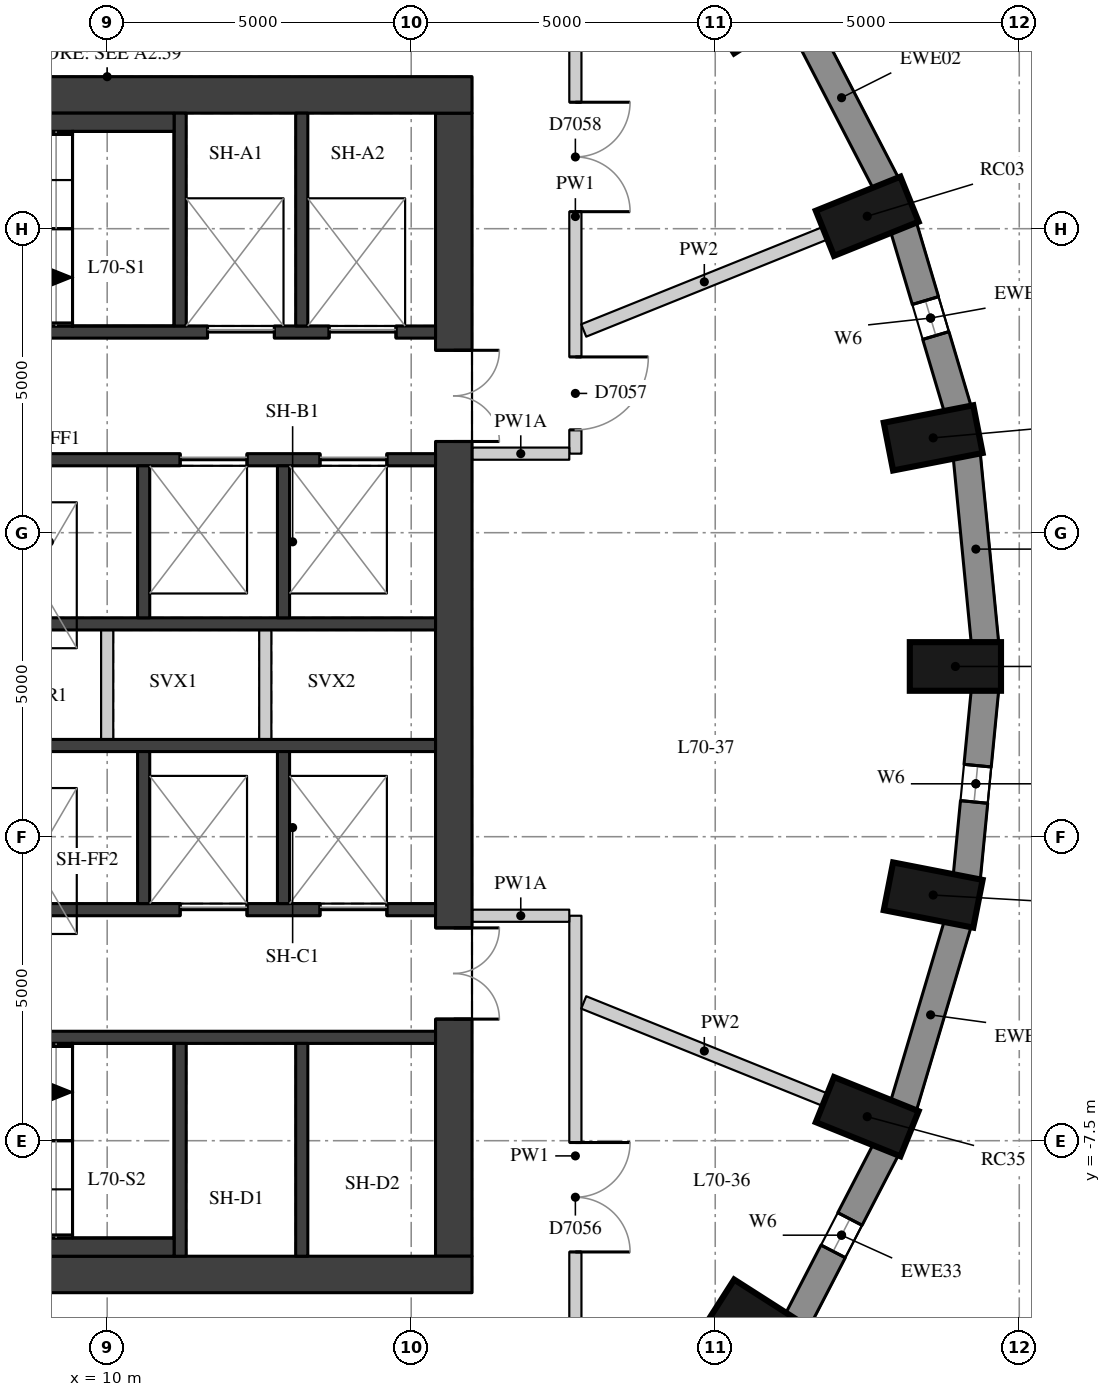
"""IFC4 building model, lengths in metres.
Left out: names, types, materials, properties, quantities, classifications, styles, units other than length and angle.
Written with IfcOpenShell. Run it as: python <this file> out.ifc"""

import sys

from ifc_helpers import new_model, si_unit, direction, frame, frame_2d, origin, origin_2d, place, context, subcontext, project, spatial, rectangle, extrude, element, fill, save


model = new_model("IFC4")
c1 = context("Model", 3, precision=1e-05, world=origin(), true_north=direction((0.0, 1.0)))
c2 = subcontext(c1, "Body", "Model", "MODEL_VIEW")
j1 = project(units=[si_unit("LENGTHUNIT", "METRE"), si_unit("PLANEANGLEUNIT", "RADIAN")], contexts=[c1])
p1 = place(None, origin())
s1 = spatial("IfcSite", under=j1, at=p1, CompositionType="ELEMENT")
p2 = place(p1, origin())
s2 = spatial("IfcBuilding", under=s1, at=p2, CompositionType="ELEMENT")
p3 = place(p2, frame((0.0, 0.0, 246.5)))
s3 = spatial("IfcBuildingStorey", under=s2, at=p3, CompositionType="ELEMENT", Elevation=246.5)
for number, where, z_axis, x_axis in (
    (1, (23.95, 0.3, 0.0), (0.0, 0.0, 1.0), (1.0, 0.0, 0.0)),
    (2, (23.585, 4.06, 0.0), (0.0, 0.0, 1.0), (0.981, 0.192, 0.0)),
    (3, (22.5, 7.705, 0.0), (0.0, 0.0, 1.0), (0.928, 0.374, 0.0)),
    (4, (20.728, 11.125, 0.0), (0.0, 0.0, 1.0), (0.843, 0.539, 0.0)),
    (5, (20.728, -10.525, 0.0), (0.0, 0.0, 1.0), (0.843, -0.539, 0.0)),
    (6, (22.5, -7.105, 0.0), (0.0, 0.0, 1.0), (0.928, -0.374, 0.0)),
    (7, (23.585, -3.459, 0.0), (0.0, 0.0, 1.0), (0.981, -0.192, 0.0)),
):
    element("IfcColumn", number, at=place(p3, frame(where, z_axis=z_axis, x_axis=x_axis)), inside=s3, PredefinedType="COLUMN", context=c2, shape_type="SweptSolid", body=[
        extrude(rectangle(XDim=1.5, YDim=0.8, at=origin_2d()), origin(), (0.0, 0.0, 1.0), 3.3),
    ])
p4 = place(p3, frame((24.437, 0.68, 0.0), z_axis=(0.0, 0.0, 1.0), x_axis=(-0.096740086873, 0.995309678237, 0.0)))
e8 = element("IfcWall", 8, at=p4, inside=s3, PredefinedType="SOLIDWALL", context=c2, shape_type="SweptSolid", body=[
    extrude(rectangle(XDim=3.114, YDim=0.45, at=frame_2d((1.557, 0.0))), origin(), (0.0, 0.0, 1.0), 3.02),
])
p5 = place(p3, frame((23.99, 4.526, 0.0), z_axis=(0.0, 0.0, 1.0), x_axis=(-0.285263800865, 0.958449040855, 0.0)))
e9 = element("IfcWall", 9, at=p5, inside=s3, PredefinedType="SOLIDWALL", context=c2, shape_type="SweptSolid", body=[
    extrude(rectangle(XDim=3.139, YDim=0.45, at=frame_2d((1.57, 0.0))), origin(), (0.0, 0.0, 1.0), 3.02),
])
p6 = place(p5, frame((1.27, 0.0, 0.4)))
e10 = element("IfcOpeningElement", 10, at=p6, cuts=e9, PredefinedType="OPENING", context=c2, shape_type="SweptSolid", body=[
    extrude(rectangle(XDim=0.6, YDim=1.75, at=frame_2d((0.3, 0.875))), frame((0.0, 0.235, 0.0), z_axis=(0.0, -1.0, 0.0), x_axis=(1.0, 0.0, 0.0)), (0.0, 0.0, 1.0), 0.47),
])
p7 = place(p3, frame((22.81, 8.24, 0.0), z_axis=(0.0, 0.0, 1.0), x_axis=(-0.459889857669, 0.887975967475, 0.0)))
e11 = element("IfcWall", 11, at=p7, inside=s3, PredefinedType="SOLIDWALL", context=c2, shape_type="SweptSolid", body=[
    extrude(rectangle(XDim=3.186, YDim=0.45, at=frame_2d((1.593, 0.0))), origin(), (0.0, 0.0, 1.0), 3.02),
])
p8 = place(p3, frame((21.345, -10.468, 0.0), z_axis=(0.0, 0.0, 1.0), x_axis=(0.459921155255, 0.887959757505, 0.0)))
e12 = element("IfcWall", 12, at=p8, inside=s3, PredefinedType="SOLIDWALL", context=c2, shape_type="SweptSolid", body=[
    extrude(rectangle(XDim=3.186, YDim=0.45, at=frame_2d((1.593, 0.0))), origin(), (0.0, 0.0, 1.0), 3.02),
])
p9 = place(p8, frame((1.293, 0.0, 0.4)))
e13 = element("IfcOpeningElement", 13, at=p9, cuts=e12, PredefinedType="OPENING", context=c2, shape_type="SweptSolid", body=[
    extrude(rectangle(XDim=0.6, YDim=1.75, at=frame_2d((0.3, 0.875))), frame((0.0, 0.235, 0.0), z_axis=(0.0, -1.0, 0.0), x_axis=(1.0, 0.0, 0.0)), (0.0, 0.0, 1.0), 0.47),
])
p10 = place(p3, frame((23.094, -6.935, 0.0), z_axis=(0.0, 0.0, 1.0), x_axis=(0.285263800865, 0.958449040855, 0.0)))
e14 = element("IfcWall", 14, at=p10, inside=s3, PredefinedType="SOLIDWALL", context=c2, shape_type="SweptSolid", body=[
    extrude(rectangle(XDim=3.139, YDim=0.45, at=frame_2d((1.57, 0.0))), origin(), (0.0, 0.0, 1.0), 3.02),
])
p11 = place(p3, frame((24.136, -3.18, 0.0), z_axis=(0.0, 0.0, 1.0), x_axis=(0.09673253904, 0.995310411827, 0.0)))
e15 = element("IfcWall", 15, at=p11, inside=s3, PredefinedType="SOLIDWALL", context=c2, shape_type="SweptSolid", body=[
    extrude(rectangle(XDim=3.115, YDim=0.45, at=frame_2d((1.557, 0.0))), origin(), (0.0, 0.0, 1.0), 3.02),
])
p12 = place(p11, frame((1.257, 0.0, 0.4)))
e16 = element("IfcOpeningElement", 16, at=p12, cuts=e15, PredefinedType="OPENING", context=c2, shape_type="SweptSolid", body=[
    extrude(rectangle(XDim=0.6, YDim=1.75, at=frame_2d((0.3, 0.875))), frame((0.0, 0.235, 0.0), z_axis=(0.0, -1.0, 0.0), x_axis=(1.0, 0.0, 0.0)), (0.0, 0.0, 1.0), 0.47),
])
p13 = place(p3, frame((15.7, -9.4, 0.0), z_axis=(0.0, 0.0, 1.0), x_axis=(0.0, 1.0, 0.0)))
e17 = element("IfcWall", 17, at=p13, inside=s3, PredefinedType="SHEAR", context=c2, shape_type="SweptSolid", body=[
    extrude(rectangle(XDim=18.8, YDim=0.6, at=frame_2d((9.4, 0.0))), origin(), (0.0, 0.0, 1.0), 3.02),
])
p14 = place(p13, frame((13.4, 0.0, 0.0)))
e18 = element("IfcOpeningElement", 18, at=p14, cuts=e17, PredefinedType="OPENING", context=c2, shape_type="SweptSolid", body=[
    extrude(rectangle(XDim=1.5, YDim=2.1, at=frame_2d((0.75, 1.05))), frame((0.0, 0.31, 0.0), z_axis=(0.0, -1.0, 0.0), x_axis=(1.0, 0.0, 0.0)), (0.0, 0.0, 1.0), 0.62),
])
p15 = place(p13, frame((3.9, 0.0, 0.0)))
e19 = element("IfcOpeningElement", 19, at=p15, cuts=e17, PredefinedType="OPENING", context=c2, shape_type="SweptSolid", body=[
    extrude(rectangle(XDim=1.5, YDim=2.1, at=frame_2d((0.75, 1.05))), frame((0.0, 0.31, 0.0), z_axis=(0.0, -1.0, 0.0), x_axis=(1.0, 0.0, 0.0)), (0.0, 0.0, 1.0), 0.62),
])
for number, where, z_axis, x_axis in (
    (20, (4.0, 9.7, 0.0), (0.0, 0.0, 1.0), (1.0, 0.0, 0.0)),
    (21, (4.0, -9.7, 0.0), (0.0, 0.0, 1.0), (1.0, 0.0, 0.0)),
):
    element("IfcWall", number, at=place(p3, frame(where, z_axis=z_axis, x_axis=x_axis)), inside=s3, PredefinedType="SHEAR", context=c2, shape_type="SweptSolid", body=[
        extrude(rectangle(XDim=12.0, YDim=0.6, at=frame_2d((6.0, 0.0))), origin(), (0.0, 0.0, 1.0), 3.02),
    ])
p16 = place(p3, frame((4.6, 5.8, 0.0), z_axis=(0.0, 0.0, 1.0), x_axis=(1.0, 0.0, 0.0)))
e22 = element("IfcWall", 22, at=p16, inside=s3, PredefinedType="SHEAR", context=c2, shape_type="SweptSolid", body=[
    extrude(rectangle(XDim=10.8, YDim=0.2, at=frame_2d((5.4, 0.0))), origin(), (0.0, 0.0, 1.0), 3.02),
])
p17 = place(p16, frame((7.05, 0.0, 0.0)))
e23 = element("IfcOpeningElement", 23, at=p17, cuts=e22, PredefinedType="OPENING", context=c2, shape_type="SweptSolid", body=[
    extrude(rectangle(XDim=1.1, YDim=2.1, at=frame_2d((0.55, 1.05))), frame((0.0, 0.11, 0.0), z_axis=(0.0, -1.0, 0.0), x_axis=(1.0, 0.0, 0.0)), (0.0, 0.0, 1.0), 0.22),
])
p18 = place(p16, frame((9.05, 0.0, 0.0)))
e24 = element("IfcOpeningElement", 24, at=p18, cuts=e22, PredefinedType="OPENING", context=c2, shape_type="SweptSolid", body=[
    extrude(rectangle(XDim=1.1, YDim=2.1, at=frame_2d((0.55, 1.05))), frame((0.0, 0.11, 0.0), z_axis=(0.0, -1.0, 0.0), x_axis=(1.0, 0.0, 0.0)), (0.0, 0.0, 1.0), 0.22),
])
p19 = place(p3, frame((4.6, 3.7, 0.0), z_axis=(0.0, 0.0, 1.0), x_axis=(1.0, 0.0, 0.0)))
e25 = element("IfcWall", 25, at=p19, inside=s3, PredefinedType="SHEAR", context=c2, shape_type="SweptSolid", body=[
    extrude(rectangle(XDim=10.8, YDim=0.2, at=frame_2d((5.4, 0.0))), origin(), (0.0, 0.0, 1.0), 3.02),
])
p20 = place(p19, frame((6.6, 0.0, 0.0)))
e26 = element("IfcOpeningElement", 26, at=p20, cuts=e25, PredefinedType="OPENING", context=c2, shape_type="SweptSolid", body=[
    extrude(rectangle(XDim=1.1, YDim=2.1, at=frame_2d((0.55, 1.05))), frame((0.0, 0.11, 0.0), z_axis=(0.0, -1.0, 0.0), x_axis=(1.0, 0.0, 0.0)), (0.0, 0.0, 1.0), 0.22),
])
p21 = place(p19, frame((8.9, 0.0, 0.0)))
e27 = element("IfcOpeningElement", 27, at=p21, cuts=e25, PredefinedType="OPENING", context=c2, shape_type="SweptSolid", body=[
    extrude(rectangle(XDim=1.1, YDim=2.1, at=frame_2d((0.55, 1.05))), frame((0.0, 0.11, 0.0), z_axis=(0.0, -1.0, 0.0), x_axis=(1.0, 0.0, 0.0)), (0.0, 0.0, 1.0), 0.22),
])
for number, where, z_axis, x_axis in (
    (28, (4.6, 1.0, 0.0), (0.0, 0.0, 1.0), (1.0, 0.0, 0.0)),
    (29, (4.6, -1.0, 0.0), (0.0, 0.0, 1.0), (1.0, 0.0, 0.0)),
):
    element("IfcWall", number, at=place(p3, frame(where, z_axis=z_axis, x_axis=x_axis)), inside=s3, PredefinedType="SHEAR", context=c2, shape_type="SweptSolid", body=[
        extrude(rectangle(XDim=10.8, YDim=0.2, at=frame_2d((5.4, 0.0))), origin(), (0.0, 0.0, 1.0), 3.02),
    ])
p22 = place(p3, frame((4.6, -3.7, 0.0), z_axis=(0.0, 0.0, 1.0), x_axis=(1.0, 0.0, 0.0)))
e30 = element("IfcWall", 30, at=p22, inside=s3, PredefinedType="SHEAR", context=c2, shape_type="SweptSolid", body=[
    extrude(rectangle(XDim=10.8, YDim=0.2, at=frame_2d((5.4, 0.0))), origin(), (0.0, 0.0, 1.0), 3.02),
])
p23 = place(p22, frame((6.6, 0.0, 0.0)))
e31 = element("IfcOpeningElement", 31, at=p23, cuts=e30, PredefinedType="OPENING", context=c2, shape_type="SweptSolid", body=[
    extrude(rectangle(XDim=1.1, YDim=2.1, at=frame_2d((0.55, 1.05))), frame((0.0, 0.11, 0.0), z_axis=(0.0, -1.0, 0.0), x_axis=(1.0, 0.0, 0.0)), (0.0, 0.0, 1.0), 0.22),
])
p24 = place(p22, frame((8.9, 0.0, 0.0)))
e32 = element("IfcOpeningElement", 32, at=p24, cuts=e30, PredefinedType="OPENING", context=c2, shape_type="SweptSolid", body=[
    extrude(rectangle(XDim=1.1, YDim=2.1, at=frame_2d((0.55, 1.05))), frame((0.0, 0.11, 0.0), z_axis=(0.0, -1.0, 0.0), x_axis=(1.0, 0.0, 0.0)), (0.0, 0.0, 1.0), 0.22),
])
p25 = place(p3, frame((4.6, -5.8, 0.0), z_axis=(0.0, 0.0, 1.0), x_axis=(1.0, 0.0, 0.0)))
e33 = element("IfcWall", 33, at=p25, inside=s3, PredefinedType="SHEAR", context=c2, shape_type="SweptSolid", body=[
    extrude(rectangle(XDim=10.8, YDim=0.2, at=frame_2d((5.4, 0.0))), origin(), (0.0, 0.0, 1.0), 3.02),
])
for number, where, z_axis, x_axis in (
    (34, (11.2, 5.9, 0.0), (0.0, 0.0, 1.0), (0.0, 1.0, 0.0)),
    (35, (11.2, -9.4, 0.0), (0.0, 0.0, 1.0), (0.0, 1.0, 0.0)),
    (36, (13.2, 5.9, 0.0), (0.0, 0.0, 1.0), (0.0, 1.0, 0.0)),
    (37, (13.2, -9.4, 0.0), (0.0, 0.0, 1.0), (0.0, 1.0, 0.0)),
):
    element("IfcWall", number, at=place(p3, frame(where, z_axis=z_axis, x_axis=x_axis)), inside=s3, PredefinedType="SHEAR", context=c2, shape_type="SweptSolid", body=[
        extrude(rectangle(XDim=3.5, YDim=0.2, at=frame_2d((1.75, 0.0))), origin(), (0.0, 0.0, 1.0), 3.02),
    ])
for number, where, z_axis, x_axis in (
    (38, (10.6, 1.1, 0.0), (0.0, 0.0, 1.0), (0.0, 1.0, 0.0)),
    (39, (10.6, -3.6, 0.0), (0.0, 0.0, 1.0), (0.0, 1.0, 0.0)),
    (40, (12.9, 1.1, 0.0), (0.0, 0.0, 1.0), (0.0, 1.0, 0.0)),
    (41, (12.9, -3.6, 0.0), (0.0, 0.0, 1.0), (0.0, 1.0, 0.0)),
):
    element("IfcWall", number, at=place(p3, frame(where, z_axis=z_axis, x_axis=x_axis)), inside=s3, PredefinedType="SHEAR", context=c2, shape_type="SweptSolid", body=[
        extrude(rectangle(XDim=2.5, YDim=0.2, at=frame_2d((1.25, 0.0))), origin(), (0.0, 0.0, 1.0), 3.02),
    ])
for number, where, z_axis, x_axis in (
    (42, (10.0, -0.9, 0.0), (0.0, 0.0, 1.0), (0.0, 1.0, 0.0)),
    (43, (12.6, -0.9, 0.0), (0.0, 0.0, 1.0), (0.0, 1.0, 0.0)),
):
    element("IfcWall", number, at=place(p3, frame(where, z_axis=z_axis, x_axis=x_axis)), inside=s3, PredefinedType="PARTITIONING", context=c2, shape_type="SweptSolid", body=[
        extrude(rectangle(XDim=1.8, YDim=0.2, at=frame_2d((0.9, 0.0))), origin(), (0.0, 0.0, 1.0), 3.02),
    ])
for number, where, z_axis, x_axis in (
    (44, (6.22, 9.25, 0.0), (0.0, 0.0, 1.0), (1.0, 0.0, 0.0)),
    (45, (6.22, -9.25, 0.0), (0.0, 0.0, 1.0), (1.0, 0.0, 0.0)),
):
    element("IfcWall", number, at=place(p3, frame(where, z_axis=z_axis, x_axis=x_axis)), inside=s3, PredefinedType="PARTITIONING", context=c2, shape_type="SweptSolid", body=[
        extrude(rectangle(XDim=4.88, YDim=0.3, at=frame_2d((2.44, 0.0))), origin(), (0.0, 0.0, 1.0), 3.02),
    ])
p26 = place(p3, frame((17.7, -3.8, 0.0), z_axis=(0.0, 0.0, 1.0), x_axis=(0.0, -1.0, 0.0)))
e46 = element("IfcWall", 46, at=p26, inside=s3, PredefinedType="PARTITIONING", context=c2, shape_type="SweptSolid", body=[
    extrude(rectangle(XDim=7.9, YDim=0.2, at=frame_2d((3.95, 0.0))), origin(), (0.0, 0.0, 1.0), 3.02),
])
p27 = place(p26, frame((3.73, 0.0, 0.0)))
e47 = element("IfcOpeningElement", 47, at=p27, cuts=e46, PredefinedType="OPENING", context=c2, shape_type="SweptSolid", body=[
    extrude(rectangle(XDim=1.8, YDim=2.1, at=frame_2d((0.9, 1.05))), frame((0.0, 0.11, 0.0), z_axis=(0.0, -1.0, 0.0), x_axis=(1.0, 0.0, 0.0)), (0.0, 0.0, 1.0), 0.22),
])
p28 = place(p3, frame((17.7, 11.6, 0.0), z_axis=(0.0, 0.0, 1.0), x_axis=(0.0, -1.0, 0.0)))
e48 = element("IfcWall", 48, at=p28, inside=s3, PredefinedType="PARTITIONING", context=c2, shape_type="SweptSolid", body=[
    extrude(rectangle(XDim=7.8, YDim=0.2, at=frame_2d((3.9, 0.0))), origin(), (0.0, 0.0, 1.0), 3.02),
])
p29 = place(p28, frame((6.209, 0.0, 0.0)))
e49 = element("IfcOpeningElement", 49, at=p29, cuts=e48, PredefinedType="OPENING", context=c2, shape_type="SweptSolid", body=[
    extrude(rectangle(XDim=1.2, YDim=2.1, at=frame_2d((0.6, 1.05))), frame((0.0, 0.11, 0.0), z_axis=(0.0, -1.0, 0.0), x_axis=(1.0, 0.0, 0.0)), (0.0, 0.0, 1.0), 0.22),
])
p30 = place(p28, frame((2.02, 0.0, 0.0)))
e50 = element("IfcOpeningElement", 50, at=p30, cuts=e48, PredefinedType="OPENING", context=c2, shape_type="SweptSolid", body=[
    extrude(rectangle(XDim=1.8, YDim=2.1, at=frame_2d((0.9, 1.05))), frame((0.0, 0.11, 0.0), z_axis=(0.0, -1.0, 0.0), x_axis=(1.0, 0.0, 0.0)), (0.0, 0.0, 1.0), 0.22),
])
for number, where, z_axis, x_axis in (
    (51, (17.6, 3.8, 0.0), (0.0, 0.0, 1.0), (-1.0, 0.0, 0.0)),
    (52, (16.004, -3.8, 0.0), (0.0, 0.0, 1.0), (1.0, 0.0, 0.0)),
):
    element("IfcWall", number, at=place(p3, frame(where, z_axis=z_axis, x_axis=x_axis)), inside=s3, PredefinedType="PARTITIONING", context=c2, shape_type="SweptSolid", body=[
        extrude(rectangle(XDim=1.596, YDim=0.2, at=frame_2d((0.798, 0.0))), origin(), (0.0, 0.0, 1.0), 2.57),
    ])
for number, where, z_axis, x_axis in (
    (53, (21.804, 7.424, 0.0), (0.0, 0.0, 1.0), (-0.928, -0.374, 0.0)),
    (54, (21.804, -6.824, 0.0), (0.0, 0.0, 1.0), (-0.928, 0.374, 0.0)),
):
    element("IfcWall", number, at=place(p3, frame(where, z_axis=z_axis, x_axis=x_axis)), inside=s3, PredefinedType="PARTITIONING", context=c2, shape_type="SweptSolid", body=[
        extrude(rectangle(XDim=4.277, YDim=0.22, at=frame_2d((2.138, 0.0))), origin(), (0.0, 0.0, 1.0), 3.02),
    ])
p31 = place(p6, origin())
e55 = element("IfcWindow", 55, at=p31, inside=s3, PartitioningType="SINGLE_PANEL", PredefinedType="WINDOW", context=c2, shape_type="SweptSolid", body=[
    extrude(rectangle(XDim=0.6, YDim=1.75, at=frame_2d((0.3, 0.875))), frame((0.0, 0.035, 0.0), z_axis=(0.0, -1.0, 0.0), x_axis=(1.0, 0.0, 0.0)), (0.0, 0.0, 1.0), 0.06),
])
fill(e10, e55)
p32 = place(p9, origin())
e56 = element("IfcWindow", 56, at=p32, inside=s3, PartitioningType="SINGLE_PANEL", PredefinedType="WINDOW", context=c2, shape_type="SweptSolid", body=[
    extrude(rectangle(XDim=0.6, YDim=1.75, at=frame_2d((0.3, 0.875))), frame((0.0, 0.035, 0.0), z_axis=(0.0, -1.0, 0.0), x_axis=(1.0, 0.0, 0.0)), (0.0, 0.0, 1.0), 0.06),
])
fill(e13, e56)
p33 = place(p12, origin())
e57 = element("IfcWindow", 57, at=p33, inside=s3, PartitioningType="SINGLE_PANEL", PredefinedType="WINDOW", context=c2, shape_type="SweptSolid", body=[
    extrude(rectangle(XDim=0.6, YDim=1.75, at=frame_2d((0.3, 0.875))), frame((0.0, 0.035, 0.0), z_axis=(0.0, -1.0, 0.0), x_axis=(1.0, 0.0, 0.0)), (0.0, 0.0, 1.0), 0.06),
])
fill(e16, e57)
p34 = place(p14, origin())
e58 = element("IfcDoor", 58, at=p34, inside=s3, OperationType="DOUBLE_DOOR_SINGLE_SWING", PredefinedType="DOOR", context=c2, shape_type="SweptSolid", body=[
    extrude(rectangle(XDim=1.5, YDim=2.1, at=frame_2d((0.75, 1.05))), frame((0.0, 0.025, 0.0), z_axis=(0.0, -1.0, 0.0), x_axis=(1.0, 0.0, 0.0)), (0.0, 0.0, 1.0), 0.05),
])
fill(e18, e58)
p35 = place(p15, origin())
e59 = element("IfcDoor", 59, at=p35, inside=s3, OperationType="DOUBLE_DOOR_SINGLE_SWING", PredefinedType="DOOR", context=c2, shape_type="SweptSolid", body=[
    extrude(rectangle(XDim=1.5, YDim=2.1, at=frame_2d((0.75, 1.05))), frame((0.0, 0.025, 0.0), z_axis=(0.0, -1.0, 0.0), x_axis=(1.0, 0.0, 0.0)), (0.0, 0.0, 1.0), 0.05),
])
fill(e19, e59)
p36 = place(p17, origin())
e60 = element("IfcDoor", 60, at=p36, inside=s3, OperationType="DOUBLE_DOOR_SLIDING", PredefinedType="DOOR", context=c2, shape_type="SweptSolid", body=[
    extrude(rectangle(XDim=1.1, YDim=2.1, at=frame_2d((0.55, 1.05))), frame((0.0, 0.025, 0.0), z_axis=(0.0, -1.0, 0.0), x_axis=(1.0, 0.0, 0.0)), (0.0, 0.0, 1.0), 0.05),
])
fill(e23, e60)
p37 = place(p18, origin())
e61 = element("IfcDoor", 61, at=p37, inside=s3, OperationType="DOUBLE_DOOR_SLIDING", PredefinedType="DOOR", context=c2, shape_type="SweptSolid", body=[
    extrude(rectangle(XDim=1.1, YDim=2.1, at=frame_2d((0.55, 1.05))), frame((0.0, 0.025, 0.0), z_axis=(0.0, -1.0, 0.0), x_axis=(1.0, 0.0, 0.0)), (0.0, 0.0, 1.0), 0.05),
])
fill(e24, e61)
p38 = place(p20, origin())
e62 = element("IfcDoor", 62, at=p38, inside=s3, OperationType="DOUBLE_DOOR_SLIDING", PredefinedType="DOOR", context=c2, shape_type="SweptSolid", body=[
    extrude(rectangle(XDim=1.1, YDim=2.1, at=frame_2d((0.55, 1.05))), frame((0.0, 0.025, 0.0), z_axis=(0.0, -1.0, 0.0), x_axis=(1.0, 0.0, 0.0)), (0.0, 0.0, 1.0), 0.05),
])
fill(e26, e62)
p39 = place(p21, origin())
e63 = element("IfcDoor", 63, at=p39, inside=s3, OperationType="DOUBLE_DOOR_SLIDING", PredefinedType="DOOR", context=c2, shape_type="SweptSolid", body=[
    extrude(rectangle(XDim=1.1, YDim=2.1, at=frame_2d((0.55, 1.05))), frame((0.0, 0.025, 0.0), z_axis=(0.0, -1.0, 0.0), x_axis=(1.0, 0.0, 0.0)), (0.0, 0.0, 1.0), 0.05),
])
fill(e27, e63)
p40 = place(p23, origin())
e64 = element("IfcDoor", 64, at=p40, inside=s3, OperationType="DOUBLE_DOOR_SLIDING", PredefinedType="DOOR", context=c2, shape_type="SweptSolid", body=[
    extrude(rectangle(XDim=1.1, YDim=2.1, at=frame_2d((0.55, 1.05))), frame((0.0, 0.025, 0.0), z_axis=(0.0, -1.0, 0.0), x_axis=(1.0, 0.0, 0.0)), (0.0, 0.0, 1.0), 0.05),
])
fill(e31, e64)
p41 = place(p24, origin())
e65 = element("IfcDoor", 65, at=p41, inside=s3, OperationType="DOUBLE_DOOR_SLIDING", PredefinedType="DOOR", context=c2, shape_type="SweptSolid", body=[
    extrude(rectangle(XDim=1.1, YDim=2.1, at=frame_2d((0.55, 1.05))), frame((0.0, 0.025, 0.0), z_axis=(0.0, -1.0, 0.0), x_axis=(1.0, 0.0, 0.0)), (0.0, 0.0, 1.0), 0.05),
])
fill(e32, e65)
p42 = place(p27, origin())
e66 = element("IfcDoor", 66, at=p42, inside=s3, OperationType="DOUBLE_DOOR_SINGLE_SWING", PredefinedType="DOOR", context=c2, shape_type="SweptSolid", body=[
    extrude(rectangle(XDim=1.8, YDim=2.1, at=frame_2d((0.9, 1.05))), frame((0.0, 0.025, 0.0), z_axis=(0.0, -1.0, 0.0), x_axis=(1.0, 0.0, 0.0)), (0.0, 0.0, 1.0), 0.05),
])
fill(e47, e66)
p43 = place(p29, origin())
e67 = element("IfcDoor", 67, at=p43, inside=s3, OperationType="SINGLE_SWING_LEFT", PredefinedType="DOOR", context=c2, shape_type="SweptSolid", body=[
    extrude(rectangle(XDim=1.2, YDim=2.1, at=frame_2d((0.6, 1.05))), frame((0.0, 0.025, 0.0), z_axis=(0.0, -1.0, 0.0), x_axis=(1.0, 0.0, 0.0)), (0.0, 0.0, 1.0), 0.05),
])
fill(e49, e67)
p44 = place(p30, origin())
e68 = element("IfcDoor", 68, at=p44, inside=s3, OperationType="DOUBLE_DOOR_SINGLE_SWING", PredefinedType="DOOR", context=c2, shape_type="SweptSolid", body=[
    extrude(rectangle(XDim=1.8, YDim=2.1, at=frame_2d((0.9, 1.05))), frame((0.0, 0.025, 0.0), z_axis=(0.0, -1.0, 0.0), x_axis=(1.0, 0.0, 0.0)), (0.0, 0.0, 1.0), 0.05),
])
fill(e50, e68)
save(model, sys.argv[1])
